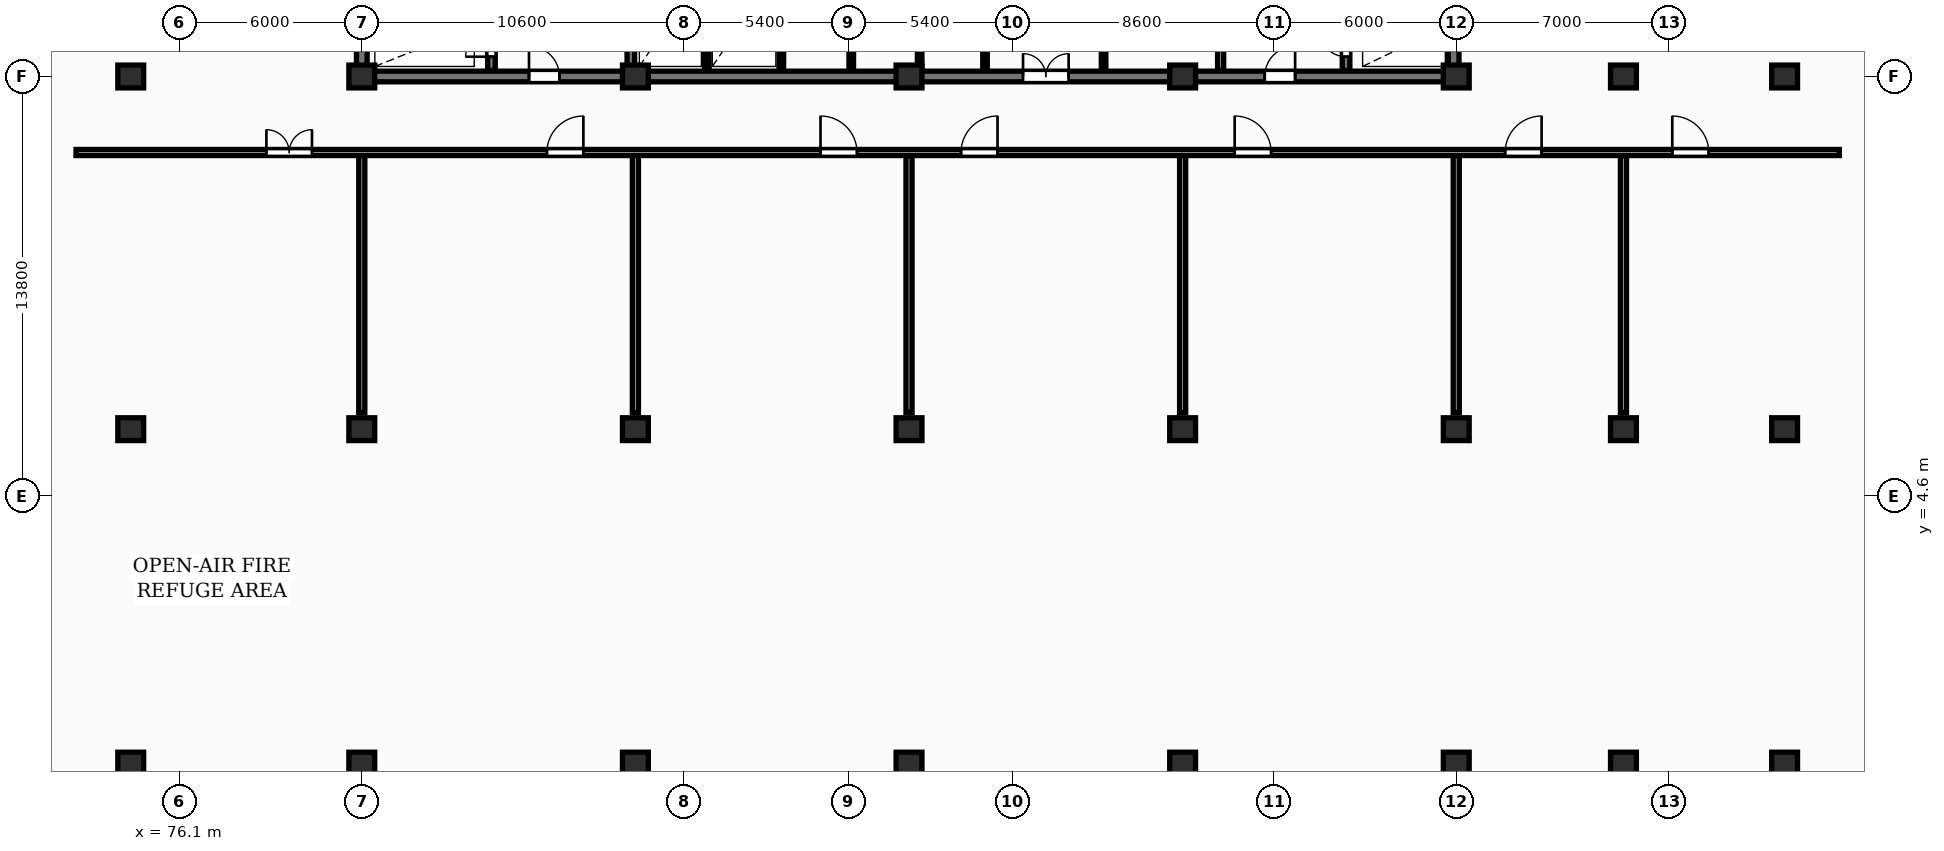
"""IFC4 building model, lengths in metres.
Left out: names, types, materials, properties, quantities, classifications, styles, units other than length and angle.
Written with IfcOpenShell. Run it as: python <this file> out.ifc"""

import sys

from ifc_helpers import new_model, si_unit, direction, frame, frame_2d, origin, origin_2d, place, context, subcontext, project, spatial, rectangle, extrude, element, fill, save


model = new_model("IFC4")
c1 = context("Model", 3, precision=1e-05, world=origin(), true_north=direction((0.0, 1.0)))
c2 = subcontext(c1, "Body", "Model", "MODEL_VIEW")
j1 = project(units=[si_unit("LENGTHUNIT", "METRE"), si_unit("PLANEANGLEUNIT", "RADIAN")], contexts=[c1])
p1 = place(None, origin())
s1 = spatial("IfcSite", under=j1, at=p1, CompositionType="ELEMENT")
p2 = place(p1, origin())
s2 = spatial("IfcBuilding", under=s1, at=p2, CompositionType="ELEMENT")
p3 = place(p2, frame((0.0, 0.0, 157.3)))
s3 = spatial("IfcBuildingStorey", under=s2, at=p3, CompositionType="ELEMENT", Elevation=157.3)
for number, where, z_axis, x_axis in (
    (1, (74.5, -4.2, 0.0), (0.0, 0.0, 1.0), (1.0, 0.0, 0.0)),
    (2, (74.5, 6.8, 0.0), (0.0, 0.0, 1.0), (1.0, 0.0, 0.0)),
    (3, (74.5, 18.4, 0.0), (0.0, 0.0, 1.0), (1.0, 0.0, 0.0)),
    (4, (82.1, -4.2, 0.0), (0.0, 0.0, 1.0), (1.0, 0.0, 0.0)),
    (5, (82.1, 6.8, 0.0), (0.0, 0.0, 1.0), (1.0, 0.0, 0.0)),
    (6, (82.1, 18.4, 0.0), (0.0, 0.0, 1.0), (1.0, 0.0, 0.0)),
    (7, (91.1, -4.2, 0.0), (0.0, 0.0, 1.0), (1.0, 0.0, 0.0)),
    (8, (91.1, 6.8, 0.0), (0.0, 0.0, 1.0), (1.0, 0.0, 0.0)),
    (9, (91.1, 18.4, 0.0), (0.0, 0.0, 1.0), (1.0, 0.0, 0.0)),
    (10, (100.1, -4.2, 0.0), (0.0, 0.0, 1.0), (1.0, 0.0, 0.0)),
    (11, (100.1, 6.8, 0.0), (0.0, 0.0, 1.0), (1.0, 0.0, 0.0)),
    (12, (100.1, 18.4, 0.0), (0.0, 0.0, 1.0), (1.0, 0.0, 0.0)),
    (13, (109.1, -4.2, 0.0), (0.0, 0.0, 1.0), (1.0, 0.0, 0.0)),
    (14, (109.1, 6.8, 0.0), (0.0, 0.0, 1.0), (1.0, 0.0, 0.0)),
    (15, (109.1, 18.4, 0.0), (0.0, 0.0, 1.0), (1.0, 0.0, 0.0)),
    (16, (118.1, -4.2, 0.0), (0.0, 0.0, 1.0), (1.0, 0.0, 0.0)),
    (17, (118.1, 6.8, 0.0), (0.0, 0.0, 1.0), (1.0, 0.0, 0.0)),
    (18, (118.1, 18.4, 0.0), (0.0, 0.0, 1.0), (1.0, 0.0, 0.0)),
    (19, (123.6, -4.2, 0.0), (0.0, 0.0, 1.0), (1.0, 0.0, 0.0)),
    (20, (123.6, 6.8, 0.0), (0.0, 0.0, 1.0), (1.0, 0.0, 0.0)),
    (21, (123.6, 18.4, 0.0), (0.0, 0.0, 1.0), (1.0, 0.0, 0.0)),
    (22, (128.9, -4.2, 0.0), (0.0, 0.0, 1.0), (1.0, 0.0, 0.0)),
    (23, (128.9, 6.8, 0.0), (0.0, 0.0, 1.0), (1.0, 0.0, 0.0)),
    (24, (128.9, 18.4, 0.0), (0.0, 0.0, 1.0), (1.0, 0.0, 0.0)),
):
    element("IfcColumn", number, at=place(p3, frame(where, z_axis=z_axis, x_axis=x_axis)), inside=s3, PredefinedType="COLUMN", context=c2, shape_type="SweptSolid", body=[
        extrude(rectangle(XDim=0.85, YDim=0.75, at=origin_2d()), origin(), (0.0, 0.0, 1.0), 4.8),
    ])
for number, where, z_axis, x_axis in (
    (25, (82.1, 18.575, 0.0), (0.0, 0.0, 1.0), (0.0, 1.0, 0.0)),
    (26, (118.015, 18.575, 0.0), (0.0, 0.0, 1.0), (0.0, 1.0, 0.0)),
):
    element("IfcWall", number, at=place(p3, frame(where, z_axis=z_axis, x_axis=x_axis)), inside=s3, PredefinedType="SHEAR", context=c2, shape_type="SweptSolid", body=[
        extrude(rectangle(XDim=11.65, YDim=0.35, at=frame_2d((5.825, 0.0))), origin(), (0.0, 0.0, 1.0), 4.8),
    ])
p4 = place(p3, frame((81.925, 18.4, 0.0), z_axis=(0.0, 0.0, 1.0), x_axis=(1.0, 0.0, 0.0)))
e27 = element("IfcWall", 27, at=p4, inside=s3, PredefinedType="SHEAR", context=c2, shape_type="SweptSolid", body=[
    extrude(rectangle(XDim=36.265, YDim=0.35, at=frame_2d((18.132, 0.0))), origin(), (0.0, 0.0, 1.0), 4.8),
])
p5 = place(p4, frame((5.675, 0.0, 0.0)))
e28 = element("IfcOpeningElement", 28, at=p5, cuts=e27, PredefinedType="OPENING", context=c2, shape_type="SweptSolid", body=[
    extrude(rectangle(XDim=1.0, YDim=2.15, at=frame_2d((0.5, 1.075))), frame((0.0, 0.185, 0.0), z_axis=(0.0, -1.0, 0.0), x_axis=(1.0, 0.0, 0.0)), (0.0, 0.0, 1.0), 0.37),
])
p6 = place(p4, frame((21.925, 0.0, 0.0)))
e29 = element("IfcOpeningElement", 29, at=p6, cuts=e27, PredefinedType="OPENING", context=c2, shape_type="SweptSolid", body=[
    extrude(rectangle(XDim=1.5, YDim=2.2, at=frame_2d((0.75, 1.1))), frame((0.0, 0.185, 0.0), z_axis=(0.0, -1.0, 0.0), x_axis=(1.0, 0.0, 0.0)), (0.0, 0.0, 1.0), 0.37),
])
p7 = place(p4, frame((29.875, 0.0, 0.0)))
e30 = element("IfcOpeningElement", 30, at=p7, cuts=e27, PredefinedType="OPENING", context=c2, shape_type="SweptSolid", body=[
    extrude(rectangle(XDim=1.0, YDim=2.15, at=frame_2d((0.5, 1.075))), frame((0.0, 0.185, 0.0), z_axis=(0.0, -1.0, 0.0), x_axis=(1.0, 0.0, 0.0)), (0.0, 0.0, 1.0), 0.37),
])
p8 = place(p3, frame((86.365, 18.6, 0.0), z_axis=(0.0, 0.0, 1.0), x_axis=(0.0, 1.0, 0.0)))
e31 = element("IfcWall", 31, at=p8, inside=s3, PredefinedType="SHEAR", context=c2, shape_type="SweptSolid", body=[
    extrude(rectangle(XDim=11.6, YDim=0.25, at=frame_2d((5.8, 0.0))), origin(), (0.0, 0.0, 1.0), 4.8),
])
p9 = place(p8, frame((0.45, 0.0, 0.0)))
e32 = element("IfcOpeningElement", 32, at=p9, cuts=e31, PredefinedType="OPENING", context=c2, shape_type="SweptSolid", body=[
    extrude(rectangle(XDim=0.85, YDim=2.05, at=frame_2d((0.425, 1.025))), frame((0.0, 0.135, 0.0), z_axis=(0.0, -1.0, 0.0), x_axis=(1.0, 0.0, 0.0)), (0.0, 0.0, 1.0), 0.27),
])
p10 = place(p8, frame((2.05, 0.0, 0.0)))
e33 = element("IfcOpeningElement", 33, at=p10, cuts=e31, PredefinedType="OPENING", context=c2, shape_type="SweptSolid", body=[
    extrude(rectangle(XDim=1.1, YDim=2.1, at=frame_2d((0.55, 1.05))), frame((0.0, 0.135, 0.0), z_axis=(0.0, -1.0, 0.0), x_axis=(1.0, 0.0, 0.0)), (0.0, 0.0, 1.0), 0.27),
])
p11 = place(p8, frame((9.95, 0.0, 0.0)))
e34 = element("IfcOpeningElement", 34, at=p11, cuts=e31, PredefinedType="OPENING", context=c2, shape_type="SweptSolid", body=[
    extrude(rectangle(XDim=0.85, YDim=2.05, at=frame_2d((0.425, 1.025))), frame((0.0, 0.135, 0.0), z_axis=(0.0, -1.0, 0.0), x_axis=(1.0, 0.0, 0.0)), (0.0, 0.0, 1.0), 0.27),
])
p12 = place(p3, frame((90.95, 18.6, 0.0), z_axis=(0.0, 0.0, 1.0), x_axis=(0.0, 1.0, 0.0)))
e35 = element("IfcWall", 35, at=p12, inside=s3, PredefinedType="SHEAR", context=c2, shape_type="SweptSolid", body=[
    extrude(rectangle(XDim=11.6, YDim=0.25, at=frame_2d((5.8, 0.0))), origin(), (0.0, 0.0, 1.0), 4.8),
])
p13 = place(p12, frame((4.6, 0.0, 0.0)))
e36 = element("IfcOpeningElement", 36, at=p13, cuts=e35, PredefinedType="OPENING", context=c2, shape_type="SweptSolid", body=[
    extrude(rectangle(XDim=1.1, YDim=2.1, at=frame_2d((0.55, 1.05))), frame((0.0, 0.135, 0.0), z_axis=(0.0, -1.0, 0.0), x_axis=(1.0, 0.0, 0.0)), (0.0, 0.0, 1.0), 0.27),
])
for number, where, z_axis, x_axis in (
    (37, (93.45, 18.6, 0.0), (0.0, 0.0, 1.0), (0.0, 1.0, 0.0)),
    (38, (95.9, 18.6, 0.0), (0.0, 0.0, 1.0), (0.0, 1.0, 0.0)),
    (39, (98.2, 18.6, 0.0), (0.0, 0.0, 1.0), (0.0, 1.0, 0.0)),
):
    element("IfcWall", number, at=place(p3, frame(where, z_axis=z_axis, x_axis=x_axis)), inside=s3, PredefinedType="PARTITIONING", context=c2, shape_type="SweptSolid", body=[
        extrude(rectangle(XDim=3.6, YDim=0.15, at=frame_2d((1.8, 0.0))), origin(), (0.0, 0.0, 1.0), 4.48),
    ])
p14 = place(p3, frame((100.45, 18.6, 0.0), z_axis=(0.0, 0.0, 1.0), x_axis=(0.0, 1.0, 0.0)))
e40 = element("IfcWall", 40, at=p14, inside=s3, PredefinedType="PARTITIONING", context=c2, shape_type="SweptSolid", body=[
    extrude(rectangle(XDim=3.6, YDim=0.15, at=frame_2d((1.8, 0.0))), origin(), (0.0, 0.0, 1.0), 3.33),
])
for number, where, z_axis, x_axis in (
    (41, (102.6, 18.6, 0.0), (0.0, 0.0, 1.0), (0.0, 1.0, 0.0)),
    (42, (106.5, 18.6, 0.0), (0.0, 0.0, 1.0), (0.0, 1.0, 0.0)),
):
    element("IfcWall", number, at=place(p3, frame(where, z_axis=z_axis, x_axis=x_axis)), inside=s3, PredefinedType="PARTITIONING", context=c2, shape_type="SweptSolid", body=[
        extrude(rectangle(XDim=3.6, YDim=0.15, at=frame_2d((1.8, 0.0))), origin(), (0.0, 0.0, 1.0), 4.48),
    ])
p15 = place(p3, frame((110.35, 18.6, 0.0), z_axis=(0.0, 0.0, 1.0), x_axis=(0.0, 1.0, 0.0)))
e43 = element("IfcWall", 43, at=p15, inside=s3, PredefinedType="PARTITIONING", context=c2, shape_type="SweptSolid", body=[
    extrude(rectangle(XDim=11.6, YDim=0.2, at=frame_2d((5.8, 0.0))), origin(), (0.0, 0.0, 1.0), 4.48),
])
p16 = place(p15, frame((5.2, 0.0, 0.0)))
e44 = element("IfcOpeningElement", 44, at=p16, cuts=e43, PredefinedType="OPENING", context=c2, shape_type="SweptSolid", body=[
    extrude(rectangle(XDim=1.1, YDim=2.15, at=frame_2d((0.55, 1.075))), frame((0.0, 0.11, 0.0), z_axis=(0.0, -1.0, 0.0), x_axis=(1.0, 0.0, 0.0)), (0.0, 0.0, 1.0), 0.22),
])
p17 = place(p3, frame((114.475, 18.6, 0.0), z_axis=(0.0, 0.0, 1.0), x_axis=(0.0, 1.0, 0.0)))
e45 = element("IfcWall", 45, at=p17, inside=s3, PredefinedType="SHEAR", context=c2, shape_type="SweptSolid", body=[
    extrude(rectangle(XDim=11.6, YDim=0.25, at=frame_2d((5.8, 0.0))), origin(), (0.0, 0.0, 1.0), 4.8),
])
p18 = place(p17, frame((0.45, 0.0, 0.0)))
e46 = element("IfcOpeningElement", 46, at=p18, cuts=e45, PredefinedType="OPENING", context=c2, shape_type="SweptSolid", body=[
    extrude(rectangle(XDim=0.85, YDim=2.05, at=frame_2d((0.425, 1.025))), frame((0.0, 0.135, 0.0), z_axis=(0.0, -1.0, 0.0), x_axis=(1.0, 0.0, 0.0)), (0.0, 0.0, 1.0), 0.27),
])
p19 = place(p17, frame((2.05, 0.0, 0.0)))
e47 = element("IfcOpeningElement", 47, at=p19, cuts=e45, PredefinedType="OPENING", context=c2, shape_type="SweptSolid", body=[
    extrude(rectangle(XDim=1.1, YDim=2.1, at=frame_2d((0.55, 1.05))), frame((0.0, 0.135, 0.0), z_axis=(0.0, -1.0, 0.0), x_axis=(1.0, 0.0, 0.0)), (0.0, 0.0, 1.0), 0.27),
])
p20 = place(p17, frame((9.95, 0.0, 0.0)))
e48 = element("IfcOpeningElement", 48, at=p20, cuts=e45, PredefinedType="OPENING", context=c2, shape_type="SweptSolid", body=[
    extrude(rectangle(XDim=0.85, YDim=2.05, at=frame_2d((0.425, 1.025))), frame((0.0, 0.135, 0.0), z_axis=(0.0, -1.0, 0.0), x_axis=(1.0, 0.0, 0.0)), (0.0, 0.0, 1.0), 0.27),
])
for number, where, z_axis, x_axis in (
    (49, (82.1, 7.35, 0.0), (0.0, 0.0, 1.0), (0.0, 1.0, 0.0)),
    (50, (91.1, 7.35, 0.0), (0.0, 0.0, 1.0), (0.0, 1.0, 0.0)),
    (51, (100.1, 7.35, 0.0), (0.0, 0.0, 1.0), (0.0, 1.0, 0.0)),
    (52, (109.1, 7.35, 0.0), (0.0, 0.0, 1.0), (0.0, 1.0, 0.0)),
    (53, (118.1, 7.35, 0.0), (0.0, 0.0, 1.0), (0.0, 1.0, 0.0)),
    (54, (123.6, 7.35, 0.0), (0.0, 0.0, 1.0), (0.0, 1.0, 0.0)),
):
    element("IfcWall", number, at=place(p3, frame(where, z_axis=z_axis, x_axis=x_axis)), inside=s3, PredefinedType="PARTITIONING", context=c2, shape_type="SweptSolid", body=[
        extrude(rectangle(XDim=8.45, YDim=0.2, at=frame_2d((4.225, 0.0))), origin(), (0.0, 0.0, 1.0), 3.33),
    ])
p21 = place(p3, frame((72.7, 15.9, 0.0), z_axis=(0.0, 0.0, 1.0), x_axis=(1.0, 0.0, 0.0)))
e55 = element("IfcWall", 55, at=p21, inside=s3, PredefinedType="PARTITIONING", context=c2, shape_type="SweptSolid", body=[
    extrude(rectangle(XDim=58.0, YDim=0.2, at=frame_2d((29.0, 0.0))), origin(), (0.0, 0.0, 1.0), 4.48),
])
p22 = place(p21, frame((6.262, 0.0, 0.0)))
e56 = element("IfcOpeningElement", 56, at=p22, cuts=e55, PredefinedType="OPENING", context=c2, shape_type="SweptSolid", body=[
    extrude(rectangle(XDim=1.5, YDim=2.18, at=frame_2d((0.75, 1.09))), frame((0.0, 0.11, 0.0), z_axis=(0.0, -1.0, 0.0), x_axis=(1.0, 0.0, 0.0)), (0.0, 0.0, 1.0), 0.22),
])
p23 = place(p21, frame((15.489, 0.0, 0.0)))
e57 = element("IfcOpeningElement", 57, at=p23, cuts=e55, PredefinedType="OPENING", context=c2, shape_type="SweptSolid", body=[
    extrude(rectangle(XDim=1.2, YDim=2.15, at=frame_2d((0.6, 1.075))), frame((0.0, 0.11, 0.0), z_axis=(0.0, -1.0, 0.0), x_axis=(1.0, 0.0, 0.0)), (0.0, 0.0, 1.0), 0.22),
])
p24 = place(p21, frame((24.489, 0.0, 0.0)))
e58 = element("IfcOpeningElement", 58, at=p24, cuts=e55, PredefinedType="OPENING", context=c2, shape_type="SweptSolid", body=[
    extrude(rectangle(XDim=1.2, YDim=2.15, at=frame_2d((0.6, 1.075))), frame((0.0, 0.11, 0.0), z_axis=(0.0, -1.0, 0.0), x_axis=(1.0, 0.0, 0.0)), (0.0, 0.0, 1.0), 0.22),
])
p25 = place(p21, frame((29.111, 0.0, 0.0)))
e59 = element("IfcOpeningElement", 59, at=p25, cuts=e55, PredefinedType="OPENING", context=c2, shape_type="SweptSolid", body=[
    extrude(rectangle(XDim=1.2, YDim=2.15, at=frame_2d((0.6, 1.075))), frame((0.0, 0.11, 0.0), z_axis=(0.0, -1.0, 0.0), x_axis=(1.0, 0.0, 0.0)), (0.0, 0.0, 1.0), 0.22),
])
p26 = place(p21, frame((38.111, 0.0, 0.0)))
e60 = element("IfcOpeningElement", 60, at=p26, cuts=e55, PredefinedType="OPENING", context=c2, shape_type="SweptSolid", body=[
    extrude(rectangle(XDim=1.2, YDim=2.15, at=frame_2d((0.6, 1.075))), frame((0.0, 0.11, 0.0), z_axis=(0.0, -1.0, 0.0), x_axis=(1.0, 0.0, 0.0)), (0.0, 0.0, 1.0), 0.22),
])
p27 = place(p21, frame((47.008, 0.0, 0.0)))
e61 = element("IfcOpeningElement", 61, at=p27, cuts=e55, PredefinedType="OPENING", context=c2, shape_type="SweptSolid", body=[
    extrude(rectangle(XDim=1.2, YDim=2.15, at=frame_2d((0.6, 1.075))), frame((0.0, 0.11, 0.0), z_axis=(0.0, -1.0, 0.0), x_axis=(1.0, 0.0, 0.0)), (0.0, 0.0, 1.0), 0.22),
])
p28 = place(p21, frame((52.505, 0.0, 0.0)))
e62 = element("IfcOpeningElement", 62, at=p28, cuts=e55, PredefinedType="OPENING", context=c2, shape_type="SweptSolid", body=[
    extrude(rectangle(XDim=1.2, YDim=2.15, at=frame_2d((0.6, 1.075))), frame((0.0, 0.11, 0.0), z_axis=(0.0, -1.0, 0.0), x_axis=(1.0, 0.0, 0.0)), (0.0, 0.0, 1.0), 0.22),
])
p29 = place(p5, origin())
e63 = element("IfcDoor", 63, at=p29, inside=s3, OperationType="SINGLE_SWING_LEFT", PredefinedType="DOOR", context=c2, shape_type="SweptSolid", body=[
    extrude(rectangle(XDim=1.0, YDim=2.15, at=frame_2d((0.5, 1.075))), frame((0.0, 0.025, 0.0), z_axis=(0.0, -1.0, 0.0), x_axis=(1.0, 0.0, 0.0)), (0.0, 0.0, 1.0), 0.05),
])
fill(e28, e63)
p30 = place(p6, origin())
e64 = element("IfcDoor", 64, at=p30, inside=s3, OperationType="DOUBLE_DOOR_SINGLE_SWING", PredefinedType="DOOR", context=c2, shape_type="SweptSolid", body=[
    extrude(rectangle(XDim=1.5, YDim=2.2, at=frame_2d((0.75, 1.1))), frame((0.0, 0.025, 0.0), z_axis=(0.0, -1.0, 0.0), x_axis=(1.0, 0.0, 0.0)), (0.0, 0.0, 1.0), 0.05),
])
fill(e29, e64)
p31 = place(p7, origin())
e65 = element("IfcDoor", 65, at=p31, inside=s3, OperationType="SINGLE_SWING_RIGHT", PredefinedType="DOOR", context=c2, shape_type="SweptSolid", body=[
    extrude(rectangle(XDim=1.0, YDim=2.15, at=frame_2d((0.5, 1.075))), frame((0.0, 0.025, 0.0), z_axis=(0.0, -1.0, 0.0), x_axis=(1.0, 0.0, 0.0)), (0.0, 0.0, 1.0), 0.05),
])
fill(e30, e65)
p32 = place(p9, origin())
e66 = element("IfcDoor", 66, at=p32, inside=s3, OperationType="SINGLE_SWING_LEFT", PredefinedType="DOOR", context=c2, shape_type="SweptSolid", body=[
    extrude(rectangle(XDim=0.85, YDim=2.05, at=frame_2d((0.425, 1.025))), frame((0.0, 0.025, 0.0), z_axis=(0.0, -1.0, 0.0), x_axis=(1.0, 0.0, 0.0)), (0.0, 0.0, 1.0), 0.05),
])
fill(e32, e66)
p33 = place(p18, origin())
e67 = element("IfcDoor", 67, at=p33, inside=s3, OperationType="SINGLE_SWING_RIGHT", PredefinedType="DOOR", context=c2, shape_type="SweptSolid", body=[
    extrude(rectangle(XDim=0.85, YDim=2.05, at=frame_2d((0.425, 1.025))), frame((0.0, 0.025, 0.0), z_axis=(0.0, -1.0, 0.0), x_axis=(1.0, 0.0, 0.0)), (0.0, 0.0, 1.0), 0.05),
])
fill(e46, e67)
p34 = place(p22, origin())
e68 = element("IfcDoor", 68, at=p34, inside=s3, OperationType="DOUBLE_DOOR_SINGLE_SWING", PredefinedType="DOOR", context=c2, shape_type="SweptSolid", body=[
    extrude(rectangle(XDim=1.5, YDim=2.18, at=frame_2d((0.75, 1.09))), frame((0.0, 0.025, 0.0), z_axis=(0.0, -1.0, 0.0), x_axis=(1.0, 0.0, 0.0)), (0.0, 0.0, 1.0), 0.05),
])
fill(e56, e68)
p35 = place(p23, origin())
e69 = element("IfcDoor", 69, at=p35, inside=s3, OperationType="SINGLE_SWING_RIGHT", PredefinedType="DOOR", context=c2, shape_type="SweptSolid", body=[
    extrude(rectangle(XDim=1.2, YDim=2.15, at=frame_2d((0.6, 1.075))), frame((0.0, 0.025, 0.0), z_axis=(0.0, -1.0, 0.0), x_axis=(1.0, 0.0, 0.0)), (0.0, 0.0, 1.0), 0.05),
])
fill(e57, e69)
p36 = place(p24, origin())
e70 = element("IfcDoor", 70, at=p36, inside=s3, OperationType="SINGLE_SWING_LEFT", PredefinedType="DOOR", context=c2, shape_type="SweptSolid", body=[
    extrude(rectangle(XDim=1.2, YDim=2.15, at=frame_2d((0.6, 1.075))), frame((0.0, 0.025, 0.0), z_axis=(0.0, -1.0, 0.0), x_axis=(1.0, 0.0, 0.0)), (0.0, 0.0, 1.0), 0.05),
])
fill(e58, e70)
p37 = place(p25, origin())
e71 = element("IfcDoor", 71, at=p37, inside=s3, OperationType="SINGLE_SWING_RIGHT", PredefinedType="DOOR", context=c2, shape_type="SweptSolid", body=[
    extrude(rectangle(XDim=1.2, YDim=2.15, at=frame_2d((0.6, 1.075))), frame((0.0, 0.025, 0.0), z_axis=(0.0, -1.0, 0.0), x_axis=(1.0, 0.0, 0.0)), (0.0, 0.0, 1.0), 0.05),
])
fill(e59, e71)
p38 = place(p26, origin())
e72 = element("IfcDoor", 72, at=p38, inside=s3, OperationType="SINGLE_SWING_LEFT", PredefinedType="DOOR", context=c2, shape_type="SweptSolid", body=[
    extrude(rectangle(XDim=1.2, YDim=2.15, at=frame_2d((0.6, 1.075))), frame((0.0, 0.025, 0.0), z_axis=(0.0, -1.0, 0.0), x_axis=(1.0, 0.0, 0.0)), (0.0, 0.0, 1.0), 0.05),
])
fill(e60, e72)
p39 = place(p27, origin())
e73 = element("IfcDoor", 73, at=p39, inside=s3, OperationType="SINGLE_SWING_RIGHT", PredefinedType="DOOR", context=c2, shape_type="SweptSolid", body=[
    extrude(rectangle(XDim=1.2, YDim=2.15, at=frame_2d((0.6, 1.075))), frame((0.0, 0.025, 0.0), z_axis=(0.0, -1.0, 0.0), x_axis=(1.0, 0.0, 0.0)), (0.0, 0.0, 1.0), 0.05),
])
fill(e61, e73)
p40 = place(p28, origin())
e74 = element("IfcDoor", 74, at=p40, inside=s3, OperationType="SINGLE_SWING_LEFT", PredefinedType="DOOR", context=c2, shape_type="SweptSolid", body=[
    extrude(rectangle(XDim=1.2, YDim=2.15, at=frame_2d((0.6, 1.075))), frame((0.0, 0.025, 0.0), z_axis=(0.0, -1.0, 0.0), x_axis=(1.0, 0.0, 0.0)), (0.0, 0.0, 1.0), 0.05),
])
fill(e62, e74)
save(model, sys.argv[1])
